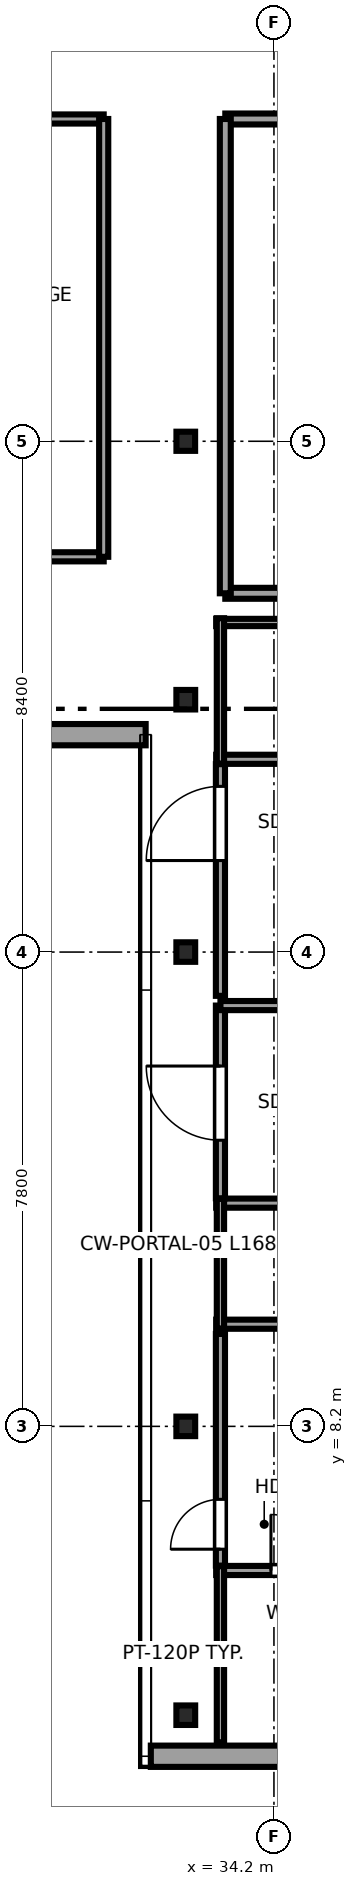
"""IFC4 building model, lengths in metres.
Left out: names, types, materials, properties, quantities, classifications, styles, units other than length and angle.
Written with IfcOpenShell. Run it as: python <this file> out.ifc"""

import sys

from ifc_helpers import new_model, si_unit, direction, frame, frame_2d, origin, origin_2d, place, context, subcontext, project, spatial, rectangle, i_section, extrude, source, transform, mapped, element, fill, save


model = new_model("IFC4")
c1 = context("Model", 3, precision=1e-05, world=origin(), true_north=direction((0.0, 1.0)))
c2 = subcontext(c1, "Body", "Model", "MODEL_VIEW")
j1 = project(units=[si_unit("LENGTHUNIT", "METRE"), si_unit("PLANEANGLEUNIT", "RADIAN")], contexts=[c1])
p1 = place(None, origin())
s1 = spatial("IfcSite", under=j1, at=p1, CompositionType="ELEMENT")
p2 = place(p1, origin())
s2 = spatial("IfcBuilding", under=s1, at=p2, CompositionType="ELEMENT")
p3 = place(p2, frame((0.0, 0.0, 255.85)))
s3 = spatial("IfcBuildingStorey", under=s2, at=p3, CompositionType="ELEMENT", Elevation=255.85)
m1 = source(origin(), c2, "Body", "SweptSolid", [
    extrude(i_section(OverallWidth=0.309, OverallDepth=0.321, WebThickness=0.014, FlangeThickness=0.022, FilletRadius=0.017, at=origin_2d()), origin(), (0.0, 0.0, 1.0), 3.55),
])
for number, where, z_axis, x_axis in (
    (1, (32.75, 3.45, 0.0), (0.0, 0.0, 1.0), (1.0, 0.0, 0.0)),
    (2, (32.75, 8.2, 0.0), (0.0, 0.0, 1.0), (1.0, 0.0, 0.0)),
    (3, (32.75, 16.0, 0.0), (0.0, 0.0, 1.0), (1.0, 0.0, 0.0)),
):
    element("IfcColumn", number, at=place(p3, frame(where, z_axis=z_axis, x_axis=x_axis)), inside=s3, PredefinedType="COLUMN", context=c2, shape_type="MappedRepresentation", body=[
        mapped(m1, transform((0.0, 0.0, 0.0), x_axis=(1.0, 0.0, 0.0), y_axis=(0.0, 1.0, 0.0), z_axis=(0.0, 0.0, 1.0), scale=1.0)),
    ])
m2 = source(origin(), c2, "Body", "SweptSolid", [
    extrude(i_section(OverallWidth=0.307, OverallDepth=0.315, WebThickness=0.012, FlangeThickness=0.019, FilletRadius=0.017, at=origin_2d()), origin(), (0.0, 0.0, 1.0), 3.55),
])
p4 = place(p3, frame((32.75, 24.4, 0.0), z_axis=(0.0, 0.0, 1.0), x_axis=(1.0, 0.0, 0.0)))
e4 = element("IfcColumn", 4, at=p4, inside=s3, PredefinedType="COLUMN", context=c2, shape_type="MappedRepresentation", body=[
    mapped(m2, transform((0.0, 0.0, 0.0), x_axis=(1.0, 0.0, 0.0), y_axis=(0.0, 1.0, 0.0), z_axis=(0.0, 0.0, 1.0), scale=1.0)),
])
p5 = place(p3, frame((32.75, 20.15, 0.0), z_axis=(0.0, 0.0, 1.0), x_axis=(1.0, 0.0, 0.0)))
e5 = element("IfcColumn", 5, at=p5, inside=s3, PredefinedType="COLUMN", context=c2, shape_type="MappedRepresentation", body=[
    mapped(m1, transform((0.0, 0.0, 0.0), x_axis=(1.0, 0.0, 0.0), y_axis=(0.0, 1.0, 0.0), z_axis=(0.0, 0.0, 1.0), scale=1.0)),
])
p6 = place(p3, frame((15.11, 19.575, 0.0), z_axis=(0.0, 0.0, 1.0), x_axis=(1.0, 0.0, 0.0)))
e6 = element("IfcWall", 6, at=p6, inside=s3, PredefinedType="SOLIDWALL", context=c2, shape_type="SweptSolid", body=[
    extrude(rectangle(XDim=16.98, YDim=0.35, at=frame_2d((8.49, 0.0))), origin(), (0.0, 0.0, 1.0), 3.37),
])
p7 = place(p6, frame((1.88, 0.0, 0.68)))
e7 = element("IfcOpeningElement", 7, at=p7, cuts=e6, PredefinedType="OPENING", context=c2, shape_type="SweptSolid", body=[
    extrude(rectangle(XDim=2.7, YDim=1.95, at=frame_2d((1.35, 0.975))), frame((0.0, 0.185, 0.0), z_axis=(0.0, -1.0, 0.0), x_axis=(1.0, 0.0, 0.0)), (0.0, 0.0, 1.0), 0.37),
])
p8 = place(p6, frame((7.14, 0.0, 0.68)))
e8 = element("IfcOpeningElement", 8, at=p8, cuts=e6, PredefinedType="OPENING", context=c2, shape_type="SweptSolid", body=[
    extrude(rectangle(XDim=2.7, YDim=1.95, at=frame_2d((1.35, 0.975))), frame((0.0, 0.185, 0.0), z_axis=(0.0, -1.0, 0.0), x_axis=(1.0, 0.0, 0.0)), (0.0, 0.0, 1.0), 0.37),
])
p9 = place(p6, frame((12.4, 0.0, 0.68)))
e9 = element("IfcOpeningElement", 9, at=p9, cuts=e6, PredefinedType="OPENING", context=c2, shape_type="SweptSolid", body=[
    extrude(rectangle(XDim=2.7, YDim=1.95, at=frame_2d((1.35, 0.975))), frame((0.0, 0.185, 0.0), z_axis=(0.0, -1.0, 0.0), x_axis=(1.0, 0.0, 0.0)), (0.0, 0.0, 1.0), 0.37),
])
p10 = place(p3, frame((32.175, 2.775, 0.0), z_axis=(0.0, 0.0, 1.0), x_axis=(1.0, 0.0, 0.0)))
e10 = element("IfcWall", 10, at=p10, inside=s3, PredefinedType="SOLIDWALL", context=c2, shape_type="SweptSolid", body=[
    extrude(rectangle(XDim=2.408, YDim=0.35, at=frame_2d((1.204, 0.0))), origin(), (0.0, 0.0, 1.0), 3.37),
])
p11 = place(p3, frame((33.25, 5.83, 0.0), z_axis=(0.0, 0.0, 1.0), x_axis=(1.0, 0.0, 0.0)))
e11 = element("IfcWall", 11, at=p11, inside=s3, PredefinedType="PARTITIONING", context=c2, shape_type="SweptSolid", body=[
    extrude(rectangle(XDim=2.722, YDim=0.15, at=frame_2d((1.361, 0.0))), origin(), (0.0, 0.0, 1.0), 3.37),
])
p12 = place(p11, frame((0.901, 0.0, 0.0)))
e12 = element("IfcOpeningElement", 12, at=p12, cuts=e11, PredefinedType="OPENING", context=c2, shape_type="SweptSolid", body=[
    extrude(rectangle(XDim=0.92, YDim=2.01, at=frame_2d((0.46, 1.005))), frame((0.0, 0.085, 0.0), z_axis=(0.0, -1.0, 0.0), x_axis=(1.0, 0.0, 0.0)), (0.0, 0.0, 1.0), 0.17),
])
p13 = place(p3, frame((33.32, 3.005, 0.0), z_axis=(0.0, 0.0, 1.0), x_axis=(0.0, 1.0, 0.0)))
e13 = element("IfcWall", 13, at=p13, inside=s3, PredefinedType="PLUMBINGWALL", context=c2, shape_type="SweptSolid", body=[
    extrude(rectangle(XDim=2.895, YDim=0.12, at=frame_2d((1.448, 0.0))), origin(), (0.0, 0.0, 1.0), 3.37),
])
p14 = place(p3, frame((33.25, 9.88, 0.0), z_axis=(0.0, 0.0, 1.0), x_axis=(1.0, 0.0, 0.0)))
e14 = element("IfcWall", 14, at=p14, inside=s3, PredefinedType="PARTITIONING", context=c2, shape_type="SweptSolid", body=[
    extrude(rectangle(XDim=5.345, YDim=0.15, at=frame_2d((2.672, 0.0))), origin(), (0.0, 0.0, 1.0), 3.37),
])
p15 = place(p3, frame((33.25, 11.871, 0.0), z_axis=(0.0, 0.0, 1.0), x_axis=(1.0, 0.0, 0.0)))
e15 = element("IfcWall", 15, at=p15, inside=s3, PredefinedType="PARTITIONING", context=c2, shape_type="SweptSolid", body=[
    extrude(rectangle(XDim=2.29, YDim=0.15, at=frame_2d((1.145, 0.0))), origin(), (0.0, 0.0, 1.0), 3.37),
])
p16 = place(p3, frame((33.32, 9.81, 0.0), z_axis=(0.0, 0.0, 1.0), x_axis=(0.0, 1.0, 0.0)))
e16 = element("IfcWall", 16, at=p16, inside=s3, PredefinedType="PLUMBINGWALL", context=c2, shape_type="SweptSolid", body=[
    extrude(rectangle(XDim=2.131, YDim=0.12, at=frame_2d((1.065, 0.0))), origin(), (0.0, 0.0, 1.0), 3.37),
])
p17 = place(p3, frame((33.25, 19.17, 0.0), z_axis=(0.0, 0.0, 1.0), x_axis=(1.0, 0.0, 0.0)))
e17 = element("IfcWall", 17, at=p17, inside=s3, PredefinedType="PARTITIONING", context=c2, shape_type="SweptSolid", body=[
    extrude(rectangle(XDim=2.29, YDim=0.15, at=frame_2d((1.145, 0.0))), origin(), (0.0, 0.0, 1.0), 3.37),
])
p18 = place(p3, frame((33.25, 21.42, 0.0), z_axis=(0.0, 0.0, 1.0), x_axis=(1.0, 0.0, 0.0)))
e18 = element("IfcWall", 18, at=p18, inside=s3, PredefinedType="PLUMBINGWALL", context=c2, shape_type="SweptSolid", body=[
    extrude(rectangle(XDim=2.29, YDim=0.12, at=frame_2d((1.145, 0.0))), origin(), (0.0, 0.0, 1.0), 3.37),
])
p19 = place(p3, frame((33.32, 19.1, 0.0), z_axis=(0.0, 0.0, 1.0), x_axis=(0.0, 1.0, 0.0)))
e19 = element("IfcWall", 19, at=p19, inside=s3, PredefinedType="PLUMBINGWALL", context=c2, shape_type="SweptSolid", body=[
    extrude(rectangle(XDim=2.39, YDim=0.12, at=frame_2d((1.195, 0.0))), origin(), (0.0, 0.0, 1.0), 3.37),
])
p20 = place(p3, frame((33.32, 5.91, 0.0), z_axis=(0.0, 0.0, 1.0), x_axis=(0.0, 1.0, 0.0)))
e20 = element("IfcWall", 20, at=p20, inside=s3, PredefinedType="PARTITIONING", context=c2, shape_type="SweptSolid", body=[
    extrude(rectangle(XDim=3.81, YDim=0.15, at=frame_2d((1.905, 0.0))), origin(), (0.0, 0.0, 1.0), 3.37),
])
p21 = place(p20, frame((0.27, 0.0, 0.0)))
e21 = element("IfcOpeningElement", 21, at=p21, cuts=e20, PredefinedType="OPENING", context=c2, shape_type="SweptSolid", body=[
    extrude(rectangle(XDim=0.82, YDim=2.01, at=frame_2d((0.41, 1.005))), frame((0.0, 0.085, 0.0), z_axis=(0.0, -1.0, 0.0), x_axis=(1.0, 0.0, 0.0)), (0.0, 0.0, 1.0), 0.17),
])
p22 = place(p3, frame((33.32, 11.951, 0.0), z_axis=(0.0, 0.0, 1.0), x_axis=(0.0, 1.0, 0.0)))
e22 = element("IfcWall", 22, at=p22, inside=s3, PredefinedType="PARTITIONING", context=c2, shape_type="SweptSolid", body=[
    extrude(rectangle(XDim=3.169, YDim=0.15, at=frame_2d((1.584, 0.0))), origin(), (0.0, 0.0, 1.0), 3.37),
])
p23 = place(p22, frame((0.955, 0.0, 0.0)))
e23 = element("IfcOpeningElement", 23, at=p23, cuts=e22, PredefinedType="OPENING", context=c2, shape_type="SweptSolid", body=[
    extrude(rectangle(XDim=1.22, YDim=2.08, at=frame_2d((0.61, 1.04))), frame((0.0, 0.085, 0.0), z_axis=(0.0, -1.0, 0.0), x_axis=(1.0, 0.0, 0.0)), (0.0, 0.0, 1.0), 0.17),
])
p24 = place(p3, frame((33.32, 15.12, 0.0), z_axis=(0.0, 0.0, 1.0), x_axis=(1.0, 0.0, 0.0)))
e24 = element("IfcWall", 24, at=p24, inside=s3, PredefinedType="PARTITIONING", context=c2, shape_type="SweptSolid", body=[
    extrude(rectangle(XDim=5.275, YDim=0.15, at=frame_2d((2.637, 0.0))), origin(), (0.0, 0.0, 1.0), 3.37),
])
p25 = place(p3, frame((33.32, 15.28, 0.0), z_axis=(0.0, 0.0, 1.0), x_axis=(0.0, 1.0, 0.0)))
e25 = element("IfcWall", 25, at=p25, inside=s3, PredefinedType="PARTITIONING", context=c2, shape_type="SweptSolid", body=[
    extrude(rectangle(XDim=3.81, YDim=0.15, at=frame_2d((1.905, 0.0))), origin(), (0.0, 0.0, 1.0), 3.37),
])
p26 = place(p25, frame((2.225, 0.0, 0.0)))
e26 = element("IfcOpeningElement", 26, at=p26, cuts=e25, PredefinedType="OPENING", context=c2, shape_type="SweptSolid", body=[
    extrude(rectangle(XDim=1.22, YDim=2.08, at=frame_2d((0.61, 1.04))), frame((0.0, 0.085, 0.0), z_axis=(0.0, -1.0, 0.0), x_axis=(1.0, 0.0, 0.0)), (0.0, 0.0, 1.0), 0.17),
])
p27 = place(p3, frame((25.6, 22.5, 0.0), z_axis=(0.0, 0.0, 1.0), x_axis=(1.0, 0.0, 0.0)))
e27 = element("IfcWall", 27, at=p27, inside=s3, PredefinedType="PARTITIONING", context=c2, shape_type="SweptSolid", body=[
    extrude(rectangle(XDim=5.8, YDim=0.15, at=frame_2d((2.9, 0.0))), origin(), (0.0, 0.0, 1.0), 3.37),
])
p28 = place(p27, frame((2.075, 0.0, 0.0)))
e28 = element("IfcOpeningElement", 28, at=p28, cuts=e27, PredefinedType="OPENING", context=c2, shape_type="SweptSolid", body=[
    extrude(rectangle(XDim=1.65, YDim=2.15, at=frame_2d((0.825, 1.075))), frame((0.0, 0.085, 0.0), z_axis=(0.0, -1.0, 0.0), x_axis=(1.0, 0.0, 0.0)), (0.0, 0.0, 1.0), 0.17),
])
p29 = place(p3, frame((25.6, 29.7, 0.0), z_axis=(0.0, 0.0, 1.0), x_axis=(1.0, 0.0, 0.0)))
e29 = element("IfcWall", 29, at=p29, inside=s3, PredefinedType="PARTITIONING", context=c2, shape_type="SweptSolid", body=[
    extrude(rectangle(XDim=5.8, YDim=0.15, at=frame_2d((2.9, 0.0))), origin(), (0.0, 0.0, 1.0), 3.37),
])
p30 = place(p3, frame((31.4, 22.5, 0.0), z_axis=(0.0, 0.0, 1.0), x_axis=(0.0, 1.0, 0.0)))
e30 = element("IfcWall", 30, at=p30, inside=s3, PredefinedType="PARTITIONING", context=c2, shape_type="SweptSolid", body=[
    extrude(rectangle(XDim=7.2, YDim=0.15, at=frame_2d((3.6, 0.0))), origin(), (0.0, 0.0, 1.0), 3.37),
])
p31 = place(p3, frame((33.4, 21.9, 0.0), z_axis=(0.0, 0.0, 1.0), x_axis=(1.0, 0.0, 0.0)))
e31 = element("IfcWall", 31, at=p31, inside=s3, PredefinedType="PARTITIONING", context=c2, shape_type="SweptSolid", body=[
    extrude(rectangle(XDim=5.195, YDim=0.18, at=frame_2d((2.598, 0.0))), origin(), (0.0, 0.0, 1.0), 3.37),
])
p32 = place(p3, frame((33.4, 29.7, 0.0), z_axis=(0.0, 0.0, 1.0), x_axis=(1.0, 0.0, 0.0)))
e32 = element("IfcWall", 32, at=p32, inside=s3, PredefinedType="PARTITIONING", context=c2, shape_type="SweptSolid", body=[
    extrude(rectangle(XDim=5.195, YDim=0.18, at=frame_2d((2.598, 0.0))), origin(), (0.0, 0.0, 1.0), 3.37),
])
p33 = place(p32, frame((1.772, 0.0, 0.0)))
e33 = element("IfcOpeningElement", 33, at=p33, cuts=e32, PredefinedType="OPENING", context=c2, shape_type="SweptSolid", body=[
    extrude(rectangle(XDim=1.65, YDim=2.15, at=frame_2d((0.825, 1.075))), frame((0.0, 0.1, 0.0), z_axis=(0.0, -1.0, 0.0), x_axis=(1.0, 0.0, 0.0)), (0.0, 0.0, 1.0), 0.2),
])
p34 = place(p3, frame((33.4, 21.9, 0.0), z_axis=(0.0, 0.0, 1.0), x_axis=(0.0, 1.0, 0.0)))
e34 = element("IfcWall", 34, at=p34, inside=s3, PredefinedType="PARTITIONING", context=c2, shape_type="SweptSolid", body=[
    extrude(rectangle(XDim=7.8, YDim=0.18, at=frame_2d((3.9, 0.0))), origin(), (0.0, 0.0, 1.0), 3.37),
])
m3 = source(origin(), c2, "Body", "SweptSolid", [
    extrude(rectangle(XDim=0.92, YDim=2.01, at=frame_2d((0.46, 1.005))), frame((0.0, 0.025, 0.0), z_axis=(0.0, -1.0, 0.0), x_axis=(1.0, 0.0, 0.0)), (0.0, 0.0, 1.0), 0.05),
])
p35 = place(p12, origin())
e35 = element("IfcDoor", 35, at=p35, inside=s3, OperationType="SINGLE_SWING_LEFT", PredefinedType="DOOR", context=c2, shape_type="MappedRepresentation", body=[
    mapped(m3, transform((0.0, 0.0, 0.0), x_axis=(1.0, 0.0, 0.0), y_axis=(0.0, 1.0, 0.0), z_axis=(0.0, 0.0, 1.0), scale=1.0)),
])
fill(e12, e35)
m4 = source(origin(), c2, "Body", "SweptSolid", [
    extrude(rectangle(XDim=0.82, YDim=2.01, at=frame_2d((0.41, 1.005))), frame((0.0, 0.025, 0.0), z_axis=(0.0, -1.0, 0.0), x_axis=(1.0, 0.0, 0.0)), (0.0, 0.0, 1.0), 0.05),
])
p36 = place(p21, origin())
e36 = element("IfcDoor", 36, at=p36, inside=s3, OperationType="SINGLE_SWING_LEFT", PredefinedType="DOOR", context=c2, shape_type="MappedRepresentation", body=[
    mapped(m4, transform((0.0, 0.0, 0.0), x_axis=(1.0, 0.0, 0.0), y_axis=(0.0, 1.0, 0.0), z_axis=(0.0, 0.0, 1.0), scale=1.0)),
])
fill(e21, e36)
m5 = source(origin(), c2, "Body", "SweptSolid", [
    extrude(rectangle(XDim=1.22, YDim=2.08, at=frame_2d((0.61, 1.04))), frame((0.0, 0.025, 0.0), z_axis=(0.0, -1.0, 0.0), x_axis=(1.0, 0.0, 0.0)), (0.0, 0.0, 1.0), 0.05),
])
p37 = place(p23, origin())
e37 = element("IfcDoor", 37, at=p37, inside=s3, OperationType="SINGLE_SWING_RIGHT", PredefinedType="DOOR", context=c2, shape_type="MappedRepresentation", body=[
    mapped(m5, transform((0.0, 0.0, 0.0), x_axis=(1.0, 0.0, 0.0), y_axis=(0.0, 1.0, 0.0), z_axis=(0.0, 0.0, 1.0), scale=1.0)),
])
fill(e23, e37)
p38 = place(p26, origin())
e38 = element("IfcDoor", 38, at=p38, inside=s3, OperationType="SINGLE_SWING_LEFT", PredefinedType="DOOR", context=c2, shape_type="MappedRepresentation", body=[
    mapped(m5, transform((0.0, 0.0, 0.0), x_axis=(1.0, 0.0, 0.0), y_axis=(0.0, 1.0, 0.0), z_axis=(0.0, 0.0, 1.0), scale=1.0)),
])
fill(e26, e38)
save(model, sys.argv[1])
